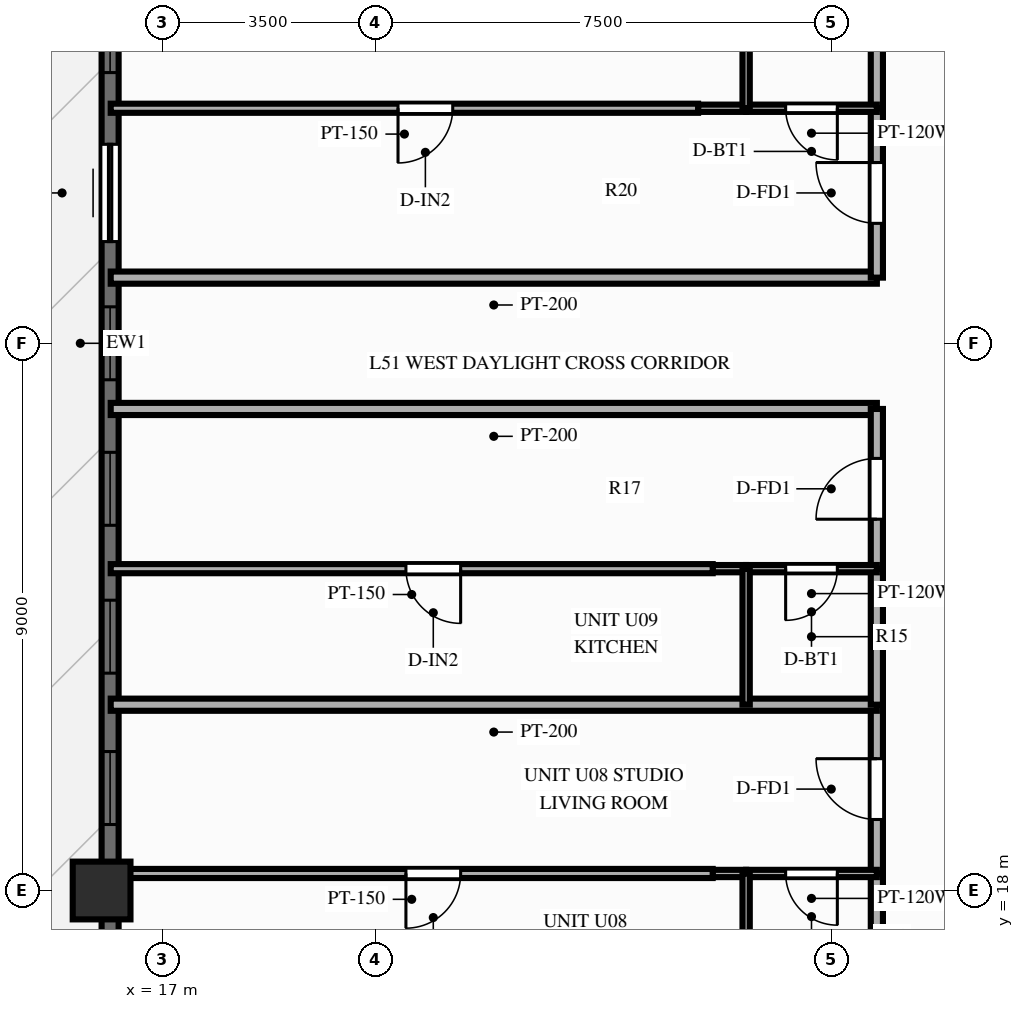
"""IFC4 building model, lengths in metres.
Left out: names, types, materials, properties, quantities, classifications, styles, units other than length and angle.
Written with IfcOpenShell. Run it as: python <this file> out.ifc"""

import sys

from ifc_helpers import new_model, si_unit, direction, frame, frame_2d, origin, origin_2d, place, context, subcontext, project, spatial, rectangle, extrude, source, transform, mapped, element, fill, save


model = new_model("IFC4")
c1 = context("Model", 3, precision=1e-05, world=origin(), true_north=direction((0.0, 1.0)))
c2 = subcontext(c1, "Body", "Model", "MODEL_VIEW")
j1 = project(units=[si_unit("LENGTHUNIT", "METRE"), si_unit("PLANEANGLEUNIT", "RADIAN")], contexts=[c1])
p1 = place(None, origin())
s1 = spatial("IfcSite", under=j1, at=p1, CompositionType="ELEMENT")
p2 = place(p1, origin())
s2 = spatial("IfcBuilding", under=s1, at=p2, CompositionType="ELEMENT")
p3 = place(p2, frame((0.0, 0.0, 163.0)))
s3 = spatial("IfcBuildingStorey", under=s2, at=p3, CompositionType="ELEMENT", Elevation=163.0)
m1 = source(origin(), c2, "Body", "SweptSolid", [
    extrude(rectangle(XDim=0.95, YDim=0.95, at=origin_2d()), origin(), (0.0, 0.0, 1.0), 3.0),
])
p4 = place(p3, frame((16.0, 18.0, 0.0), z_axis=(0.0, 0.0, 1.0), x_axis=(1.0, 0.0, 0.0)))
e1 = element("IfcColumn", 1, at=p4, inside=s3, PredefinedType="COLUMN", context=c2, shape_type="MappedRepresentation", body=[
    mapped(m1, transform((0.0, 0.0, 0.0), scale=1.0)),
])
p5 = place(p3, frame((16.14, 11.0, 0.0), z_axis=(0.0, 0.0, 1.0), x_axis=(0.0, 1.0, 0.0)))
e2 = element("IfcWall", 2, at=p5, inside=s3, PredefinedType="SOLIDWALL", context=c2, shape_type="SweptSolid", body=[
    extrude(rectangle(XDim=32.0, YDim=0.28, at=frame_2d((16.0, 0.0))), origin(), (0.0, 0.0, 1.0), 2.28),
])
p6 = place(p5, frame((1.001, 0.0, 0.25)))
e3 = element("IfcOpeningElement", 3, at=p6, cuts=e2, PredefinedType="OPENING", context=c2, shape_type="SweptSolid", body=[
    extrude(rectangle(XDim=1.2, YDim=1.5, at=frame_2d((0.6, 0.75))), frame((0.0, 0.152, 0.0), z_axis=(0.0, -1.0, 0.0), x_axis=(1.0, 0.0, 0.0)), (0.0, 0.0, 1.0), 0.304),
])
p7 = place(p5, frame((3.439, 0.0, 0.25)))
e4 = element("IfcOpeningElement", 4, at=p7, cuts=e2, PredefinedType="OPENING", context=c2, shape_type="SweptSolid", body=[
    extrude(rectangle(XDim=1.2, YDim=1.5, at=frame_2d((0.6, 0.75))), frame((0.0, 0.152, 0.0), z_axis=(0.0, -1.0, 0.0), x_axis=(1.0, 0.0, 0.0)), (0.0, 0.0, 1.0), 0.304),
])
p8 = place(p5, frame((5.588, 0.0, 0.25)))
e5 = element("IfcOpeningElement", 5, at=p8, cuts=e2, PredefinedType="OPENING", context=c2, shape_type="SweptSolid", body=[
    extrude(rectangle(XDim=0.7, YDim=1.5, at=frame_2d((0.35, 0.75))), frame((0.0, 0.152, 0.0), z_axis=(0.0, -1.0, 0.0), x_axis=(1.0, 0.0, 0.0)), (0.0, 0.0, 1.0), 0.304),
])
p9 = place(p5, frame((8.085, 0.0, 0.25)))
e6 = element("IfcOpeningElement", 6, at=p9, cuts=e2, PredefinedType="OPENING", context=c2, shape_type="SweptSolid", body=[
    extrude(rectangle(XDim=1.2, YDim=1.5, at=frame_2d((0.6, 0.75))), frame((0.0, 0.152, 0.0), z_axis=(0.0, -1.0, 0.0), x_axis=(1.0, 0.0, 0.0)), (0.0, 0.0, 1.0), 0.304),
])
p10 = place(p5, frame((10.575, 0.0, 0.25)))
e7 = element("IfcOpeningElement", 7, at=p10, cuts=e2, PredefinedType="OPENING", context=c2, shape_type="SweptSolid", body=[
    extrude(rectangle(XDim=1.2, YDim=1.5, at=frame_2d((0.6, 0.75))), frame((0.0, 0.152, 0.0), z_axis=(0.0, -1.0, 0.0), x_axis=(1.0, 0.0, 0.0)), (0.0, 0.0, 1.0), 0.304),
])
p11 = place(p5, frame((13.007, 0.0, 0.25)))
e8 = element("IfcOpeningElement", 8, at=p11, cuts=e2, PredefinedType="OPENING", context=c2, shape_type="SweptSolid", body=[
    extrude(rectangle(XDim=1.2, YDim=1.5, at=frame_2d((0.6, 0.75))), frame((0.0, 0.152, 0.0), z_axis=(0.0, -1.0, 0.0), x_axis=(1.0, 0.0, 0.0)), (0.0, 0.0, 1.0), 0.304),
])
p12 = place(p5, frame((15.4, 0.0, 0.25)))
e9 = element("IfcOpeningElement", 9, at=p12, cuts=e2, PredefinedType="OPENING", context=c2, shape_type="SweptSolid", body=[
    extrude(rectangle(XDim=1.2, YDim=1.5, at=frame_2d((0.6, 0.75))), frame((0.0, 0.152, 0.0), z_axis=(0.0, -1.0, 0.0), x_axis=(1.0, 0.0, 0.0)), (0.0, 0.0, 1.0), 0.304),
])
p13 = place(p5, frame((17.673, 0.0, 0.0)))
e10 = element("IfcOpeningElement", 10, at=p13, cuts=e2, PredefinedType="OPENING", context=c2, shape_type="SweptSolid", body=[
    extrude(rectangle(XDim=1.6, YDim=2.15, at=frame_2d((0.8, 1.075))), frame((0.0, 0.152, 0.0), z_axis=(0.0, -1.0, 0.0), x_axis=(1.0, 0.0, 0.0)), (0.0, 0.0, 1.0), 0.304),
])
p14 = place(p5, frame((20.452, 0.0, 0.25)))
e11 = element("IfcOpeningElement", 11, at=p14, cuts=e2, PredefinedType="OPENING", context=c2, shape_type="SweptSolid", body=[
    extrude(rectangle(XDim=1.2, YDim=1.5, at=frame_2d((0.6, 0.75))), frame((0.0, 0.152, 0.0), z_axis=(0.0, -1.0, 0.0), x_axis=(1.0, 0.0, 0.0)), (0.0, 0.0, 1.0), 0.304),
])
p15 = place(p5, frame((22.862, 0.0, 0.25)))
e12 = element("IfcOpeningElement", 12, at=p15, cuts=e2, PredefinedType="OPENING", context=c2, shape_type="SweptSolid", body=[
    extrude(rectangle(XDim=1.2, YDim=1.5, at=frame_2d((0.6, 0.75))), frame((0.0, 0.152, 0.0), z_axis=(0.0, -1.0, 0.0), x_axis=(1.0, 0.0, 0.0)), (0.0, 0.0, 1.0), 0.304),
])
p16 = place(p5, frame((25.734, 0.0, 0.25)))
e13 = element("IfcOpeningElement", 13, at=p16, cuts=e2, PredefinedType="OPENING", context=c2, shape_type="SweptSolid", body=[
    extrude(rectangle(XDim=0.95, YDim=1.5, at=frame_2d((0.475, 0.75))), frame((0.0, 0.152, 0.0), z_axis=(0.0, -1.0, 0.0), x_axis=(1.0, 0.0, 0.0)), (0.0, 0.0, 1.0), 0.304),
])
p17 = place(p5, frame((27.588, 0.0, 0.25)))
e14 = element("IfcOpeningElement", 14, at=p17, cuts=e2, PredefinedType="OPENING", context=c2, shape_type="SweptSolid", body=[
    extrude(rectangle(XDim=1.2, YDim=1.5, at=frame_2d((0.6, 0.75))), frame((0.0, 0.152, 0.0), z_axis=(0.0, -1.0, 0.0), x_axis=(1.0, 0.0, 0.0)), (0.0, 0.0, 1.0), 0.304),
])
p18 = place(p5, frame((29.879, 0.0, 0.25)))
e15 = element("IfcOpeningElement", 15, at=p18, cuts=e2, PredefinedType="OPENING", context=c2, shape_type="SweptSolid", body=[
    extrude(rectangle(XDim=1.2, YDim=1.5, at=frame_2d((0.6, 0.75))), frame((0.0, 0.152, 0.0), z_axis=(0.0, -1.0, 0.0), x_axis=(1.0, 0.0, 0.0)), (0.0, 0.0, 1.0), 0.304),
])
p19 = place(p3, frame((28.75, 25.92, 0.0), z_axis=(0.0, 0.0, 1.0), x_axis=(-1.0, 0.0, 0.0)))
e16 = element("IfcWall", 16, at=p19, inside=s3, PredefinedType="PARTITIONING", context=c2, shape_type="SweptSolid", body=[
    extrude(rectangle(XDim=12.6, YDim=0.2, at=frame_2d((6.3, 0.0))), origin(), (0.0, 0.0, 1.0), 2.79),
])
p20 = place(p3, frame((28.75, 16.192, 0.0), z_axis=(0.0, 0.0, 1.0), x_axis=(0.0, 1.0, 0.0)))
e17 = element("IfcWall", 17, at=p20, inside=s3, PredefinedType="PARTITIONING", context=c2, shape_type="SweptSolid", body=[
    extrude(rectangle(XDim=2.088, YDim=0.2, at=frame_2d((1.044, 0.0))), origin(), (0.0, 0.0, 1.0), 2.79),
])
p21 = place(p3, frame((28.75, 18.28, 0.0), z_axis=(0.0, 0.0, 1.0), x_axis=(0.0, 1.0, 0.0)))
e18 = element("IfcWall", 18, at=p21, inside=s3, PredefinedType="PARTITIONING", context=c2, shape_type="SweptSolid", body=[
    extrude(rectangle(XDim=2.776, YDim=0.2, at=frame_2d((1.388, 0.0))), origin(), (0.0, 0.0, 1.0), 2.79),
])
p22 = place(p21, frame((0.888, 0.0, 0.0)))
e19 = element("IfcOpeningElement", 19, at=p22, cuts=e18, PredefinedType="OPENING", context=c2, shape_type="SweptSolid", body=[
    extrude(rectangle(XDim=1.0, YDim=2.15, at=frame_2d((0.5, 1.075))), frame((0.0, 0.112, 0.0), z_axis=(0.0, -1.0, 0.0), x_axis=(1.0, 0.0, 0.0)), (0.0, 0.0, 1.0), 0.224),
])
p23 = place(p3, frame((28.75, 18.28, 0.0), z_axis=(0.0, 0.0, 1.0), x_axis=(-1.0, 0.0, 0.0)))
e20 = element("IfcWall", 20, at=p23, inside=s3, PredefinedType="PARTITIONING", context=c2, shape_type="SweptSolid", body=[
    extrude(rectangle(XDim=2.15, YDim=0.12, at=frame_2d((1.075, 0.0))), origin(), (0.0, 0.0, 1.0), 2.79),
])
p24 = place(p23, frame((0.65, 0.0, 0.0)))
e21 = element("IfcOpeningElement", 21, at=p24, cuts=e20, PredefinedType="OPENING", context=c2, shape_type="SweptSolid", body=[
    extrude(rectangle(XDim=0.85, YDim=2.05, at=frame_2d((0.425, 1.025))), frame((0.0, 0.072, 0.0), z_axis=(0.0, -1.0, 0.0), x_axis=(1.0, 0.0, 0.0)), (0.0, 0.0, 1.0), 0.144),
])
p25 = place(p3, frame((26.6, 18.28, 0.0), z_axis=(0.0, 0.0, 1.0), x_axis=(-1.0, 0.0, 0.0)))
e22 = element("IfcWall", 22, at=p25, inside=s3, PredefinedType="PARTITIONING", context=c2, shape_type="SweptSolid", body=[
    extrude(rectangle(XDim=0.55, YDim=0.12, at=frame_2d((0.275, 0.0))), origin(), (0.0, 0.0, 1.0), 2.79),
])
p26 = place(p3, frame((26.6, 16.192, 0.0), z_axis=(0.0, 0.0, 1.0), x_axis=(0.0, 1.0, 0.0)))
e23 = element("IfcWall", 23, at=p26, inside=s3, PredefinedType="PARTITIONING", context=c2, shape_type="SweptSolid", body=[
    extrude(rectangle(XDim=2.088, YDim=0.12, at=frame_2d((1.044, 0.0))), origin(), (0.0, 0.0, 1.0), 2.79),
])
p27 = place(p3, frame((26.05, 18.28, 0.0), z_axis=(0.0, 0.0, 1.0), x_axis=(-1.0, 0.0, 0.0)))
e24 = element("IfcWall", 24, at=p27, inside=s3, PredefinedType="PARTITIONING", context=c2, shape_type="SweptSolid", body=[
    extrude(rectangle(XDim=9.9, YDim=0.15, at=frame_2d((4.95, 0.0))), origin(), (0.0, 0.0, 1.0), 2.79),
])
p28 = place(p27, frame((4.145, 0.0, 0.0)))
e25 = element("IfcOpeningElement", 25, at=p28, cuts=e24, PredefinedType="OPENING", context=c2, shape_type="SweptSolid", body=[
    extrude(rectangle(XDim=0.9, YDim=2.1, at=frame_2d((0.45, 1.05))), frame((0.0, 0.087, 0.0), z_axis=(0.0, -1.0, 0.0), x_axis=(1.0, 0.0, 0.0)), (0.0, 0.0, 1.0), 0.174),
])
p29 = place(p3, frame((28.75, 21.056, 0.0), z_axis=(0.0, 0.0, 1.0), x_axis=(-1.0, 0.0, 0.0)))
e26 = element("IfcWall", 26, at=p29, inside=s3, PredefinedType="PARTITIONING", context=c2, shape_type="SweptSolid", body=[
    extrude(rectangle(XDim=12.6, YDim=0.2, at=frame_2d((6.3, 0.0))), origin(), (0.0, 0.0, 1.0), 2.79),
])
p30 = place(p3, frame((28.75, 21.056, 0.0), z_axis=(0.0, 0.0, 1.0), x_axis=(0.0, 1.0, 0.0)))
e27 = element("IfcWall", 27, at=p30, inside=s3, PredefinedType="PARTITIONING", context=c2, shape_type="SweptSolid", body=[
    extrude(rectangle(XDim=2.237, YDim=0.2, at=frame_2d((1.119, 0.0))), origin(), (0.0, 0.0, 1.0), 2.79),
])
p31 = place(p3, frame((28.75, 23.293, 0.0), z_axis=(0.0, 0.0, 1.0), x_axis=(0.0, 1.0, 0.0)))
e28 = element("IfcWall", 28, at=p31, inside=s3, PredefinedType="PARTITIONING", context=c2, shape_type="SweptSolid", body=[
    extrude(rectangle(XDim=2.627, YDim=0.2, at=frame_2d((1.313, 0.0))), origin(), (0.0, 0.0, 1.0), 2.79),
])
p32 = place(p31, frame((0.813, 0.0, 0.0)))
e29 = element("IfcOpeningElement", 29, at=p32, cuts=e28, PredefinedType="OPENING", context=c2, shape_type="SweptSolid", body=[
    extrude(rectangle(XDim=1.0, YDim=2.15, at=frame_2d((0.5, 1.075))), frame((0.0, 0.112, 0.0), z_axis=(0.0, -1.0, 0.0), x_axis=(1.0, 0.0, 0.0)), (0.0, 0.0, 1.0), 0.224),
])
p33 = place(p3, frame((28.75, 23.293, 0.0), z_axis=(0.0, 0.0, 1.0), x_axis=(-1.0, 0.0, 0.0)))
e30 = element("IfcWall", 30, at=p33, inside=s3, PredefinedType="PARTITIONING", context=c2, shape_type="SweptSolid", body=[
    extrude(rectangle(XDim=2.15, YDim=0.12, at=frame_2d((1.075, 0.0))), origin(), (0.0, 0.0, 1.0), 2.79),
])
p34 = place(p33, frame((0.65, 0.0, 0.0)))
e31 = element("IfcOpeningElement", 31, at=p34, cuts=e30, PredefinedType="OPENING", context=c2, shape_type="SweptSolid", body=[
    extrude(rectangle(XDim=0.85, YDim=2.05, at=frame_2d((0.425, 1.025))), frame((0.0, 0.072, 0.0), z_axis=(0.0, -1.0, 0.0), x_axis=(1.0, 0.0, 0.0)), (0.0, 0.0, 1.0), 0.144),
])
p35 = place(p3, frame((26.6, 23.293, 0.0), z_axis=(0.0, 0.0, 1.0), x_axis=(-1.0, 0.0, 0.0)))
e32 = element("IfcWall", 32, at=p35, inside=s3, PredefinedType="PARTITIONING", context=c2, shape_type="SweptSolid", body=[
    extrude(rectangle(XDim=0.55, YDim=0.12, at=frame_2d((0.275, 0.0))), origin(), (0.0, 0.0, 1.0), 2.79),
])
p36 = place(p3, frame((26.6, 21.056, 0.0), z_axis=(0.0, 0.0, 1.0), x_axis=(0.0, 1.0, 0.0)))
e33 = element("IfcWall", 33, at=p36, inside=s3, PredefinedType="PARTITIONING", context=c2, shape_type="SweptSolid", body=[
    extrude(rectangle(XDim=2.237, YDim=0.12, at=frame_2d((1.119, 0.0))), origin(), (0.0, 0.0, 1.0), 2.79),
])
p37 = place(p3, frame((26.05, 23.293, 0.0), z_axis=(0.0, 0.0, 1.0), x_axis=(-1.0, 0.0, 0.0)))
e34 = element("IfcWall", 34, at=p37, inside=s3, PredefinedType="PARTITIONING", context=c2, shape_type="SweptSolid", body=[
    extrude(rectangle(XDim=9.9, YDim=0.15, at=frame_2d((4.95, 0.0))), origin(), (0.0, 0.0, 1.0), 2.79),
])
p38 = place(p37, frame((4.145, 0.0, 0.0)))
e35 = element("IfcOpeningElement", 35, at=p38, cuts=e34, PredefinedType="OPENING", context=c2, shape_type="SweptSolid", body=[
    extrude(rectangle(XDim=0.9, YDim=2.1, at=frame_2d((0.45, 1.05))), frame((0.0, 0.087, 0.0), z_axis=(0.0, -1.0, 0.0), x_axis=(1.0, 0.0, 0.0)), (0.0, 0.0, 1.0), 0.174),
])
p39 = place(p3, frame((28.75, 28.08, 0.0), z_axis=(0.0, 0.0, 1.0), x_axis=(-1.0, 0.0, 0.0)))
e36 = element("IfcWall", 36, at=p39, inside=s3, PredefinedType="PARTITIONING", context=c2, shape_type="SweptSolid", body=[
    extrude(rectangle(XDim=12.6, YDim=0.2, at=frame_2d((6.3, 0.0))), origin(), (0.0, 0.0, 1.0), 2.79),
])
p40 = place(p3, frame((28.75, 28.08, 0.0), z_axis=(0.0, 0.0, 1.0), x_axis=(0.0, 1.0, 0.0)))
e37 = element("IfcWall", 37, at=p40, inside=s3, PredefinedType="PARTITIONING", context=c2, shape_type="SweptSolid", body=[
    extrude(rectangle(XDim=2.786, YDim=0.2, at=frame_2d((1.393, 0.0))), origin(), (0.0, 0.0, 1.0), 2.79),
])
p41 = place(p40, frame((0.893, 0.0, 0.0)))
e38 = element("IfcOpeningElement", 38, at=p41, cuts=e37, PredefinedType="OPENING", context=c2, shape_type="SweptSolid", body=[
    extrude(rectangle(XDim=1.0, YDim=2.15, at=frame_2d((0.5, 1.075))), frame((0.0, 0.112, 0.0), z_axis=(0.0, -1.0, 0.0), x_axis=(1.0, 0.0, 0.0)), (0.0, 0.0, 1.0), 0.224),
])
p42 = place(p3, frame((28.75, 30.866, 0.0), z_axis=(0.0, 0.0, 1.0), x_axis=(0.0, 1.0, 0.0)))
e39 = element("IfcWall", 39, at=p42, inside=s3, PredefinedType="PARTITIONING", context=c2, shape_type="SweptSolid", body=[
    extrude(rectangle(XDim=2.373, YDim=0.2, at=frame_2d((1.187, 0.0))), origin(), (0.0, 0.0, 1.0), 2.79),
])
p43 = place(p3, frame((28.75, 30.866, 0.0), z_axis=(0.0, 0.0, 1.0), x_axis=(-1.0, 0.0, 0.0)))
e40 = element("IfcWall", 40, at=p43, inside=s3, PredefinedType="PARTITIONING", context=c2, shape_type="SweptSolid", body=[
    extrude(rectangle(XDim=2.15, YDim=0.12, at=frame_2d((1.075, 0.0))), origin(), (0.0, 0.0, 1.0), 2.79),
])
p44 = place(p43, frame((0.65, 0.0, 0.0)))
e41 = element("IfcOpeningElement", 41, at=p44, cuts=e40, PredefinedType="OPENING", context=c2, shape_type="SweptSolid", body=[
    extrude(rectangle(XDim=0.85, YDim=2.05, at=frame_2d((0.425, 1.025))), frame((0.0, 0.072, 0.0), z_axis=(0.0, -1.0, 0.0), x_axis=(1.0, 0.0, 0.0)), (0.0, 0.0, 1.0), 0.144),
])
p45 = place(p3, frame((26.6, 30.866, 0.0), z_axis=(0.0, 0.0, 1.0), x_axis=(-1.0, 0.0, 0.0)))
e42 = element("IfcWall", 42, at=p45, inside=s3, PredefinedType="PARTITIONING", context=c2, shape_type="SweptSolid", body=[
    extrude(rectangle(XDim=0.79, YDim=0.12, at=frame_2d((0.395, 0.0))), origin(), (0.0, 0.0, 1.0), 2.79),
])
p46 = place(p3, frame((26.6, 30.866, 0.0), z_axis=(0.0, 0.0, 1.0), x_axis=(0.0, 1.0, 0.0)))
e43 = element("IfcWall", 43, at=p46, inside=s3, PredefinedType="PARTITIONING", context=c2, shape_type="SweptSolid", body=[
    extrude(rectangle(XDim=2.373, YDim=0.12, at=frame_2d((1.187, 0.0))), origin(), (0.0, 0.0, 1.0), 2.79),
])
p47 = place(p3, frame((25.81, 30.866, 0.0), z_axis=(0.0, 0.0, 1.0), x_axis=(-1.0, 0.0, 0.0)))
e44 = element("IfcWall", 44, at=p47, inside=s3, PredefinedType="PARTITIONING", context=c2, shape_type="SweptSolid", body=[
    extrude(rectangle(XDim=9.66, YDim=0.15, at=frame_2d((4.83, 0.0))), origin(), (0.0, 0.0, 1.0), 2.79),
])
p48 = place(p47, frame((4.035, 0.0, 0.0)))
e45 = element("IfcOpeningElement", 45, at=p48, cuts=e44, PredefinedType="OPENING", context=c2, shape_type="SweptSolid", body=[
    extrude(rectangle(XDim=0.9, YDim=2.1, at=frame_2d((0.45, 1.05))), frame((0.0, 0.087, 0.0), z_axis=(0.0, -1.0, 0.0), x_axis=(1.0, 0.0, 0.0)), (0.0, 0.0, 1.0), 0.174),
])
m2 = source(origin(), c2, "Body", "SweptSolid", [
    extrude(rectangle(XDim=1.2, YDim=1.5, at=frame_2d((0.6, 0.75))), frame((0.0, 0.03, 0.0), z_axis=(0.0, -1.0, 0.0), x_axis=(1.0, 0.0, 0.0)), (0.0, 0.0, 1.0), 0.06),
])
p49 = place(p9, origin())
e46 = element("IfcWindow", 46, at=p49, inside=s3, PartitioningType="SINGLE_PANEL", PredefinedType="WINDOW", context=c2, shape_type="MappedRepresentation", body=[
    mapped(m2, transform((0.0, 0.0, 0.0), scale=1.0)),
])
fill(e6, e46)
p50 = place(p10, origin())
e47 = element("IfcWindow", 47, at=p50, inside=s3, PartitioningType="SINGLE_PANEL", PredefinedType="WINDOW", context=c2, shape_type="MappedRepresentation", body=[
    mapped(m2, transform((0.0, 0.0, 0.0), scale=1.0)),
])
fill(e7, e47)
p51 = place(p11, origin())
e48 = element("IfcWindow", 48, at=p51, inside=s3, PartitioningType="SINGLE_PANEL", PredefinedType="WINDOW", context=c2, shape_type="MappedRepresentation", body=[
    mapped(m2, transform((0.0, 0.0, 0.0), scale=1.0)),
])
fill(e8, e48)
p52 = place(p12, origin())
e49 = element("IfcWindow", 49, at=p52, inside=s3, PartitioningType="SINGLE_PANEL", PredefinedType="WINDOW", context=c2, shape_type="MappedRepresentation", body=[
    mapped(m2, transform((0.0, 0.0, 0.0), scale=1.0)),
])
fill(e9, e49)
m3 = source(origin(), c2, "Body", "SweptSolid", [
    extrude(rectangle(XDim=1.6, YDim=2.15, at=frame_2d((0.8, 1.075))), frame((0.0, 0.025, 0.0), z_axis=(0.0, -1.0, 0.0), x_axis=(1.0, 0.0, 0.0)), (0.0, 0.0, 1.0), 0.05),
])
p53 = place(p13, origin())
e50 = element("IfcDoor", 50, at=p53, inside=s3, OperationType="SLIDING_TO_LEFT", PredefinedType="DOOR", context=c2, shape_type="MappedRepresentation", body=[
    mapped(m3, transform((0.0, 0.0, 0.0), scale=1.0)),
])
fill(e10, e50)
p54 = place(p14, origin())
e51 = element("IfcWindow", 51, at=p54, inside=s3, PartitioningType="SINGLE_PANEL", PredefinedType="WINDOW", context=c2, shape_type="MappedRepresentation", body=[
    mapped(m2, transform((0.0, 0.0, 0.0), scale=1.0)),
])
fill(e11, e51)
m4 = source(origin(), c2, "Body", "SweptSolid", [
    extrude(rectangle(XDim=1.0, YDim=2.15, at=frame_2d((0.5, 1.075))), frame((0.0, 0.025, 0.0), z_axis=(0.0, -1.0, 0.0), x_axis=(1.0, 0.0, 0.0)), (0.0, 0.0, 1.0), 0.05),
])
p55 = place(p22, origin())
e52 = element("IfcDoor", 52, at=p55, inside=s3, OperationType="SINGLE_SWING_RIGHT", PredefinedType="DOOR", context=c2, shape_type="MappedRepresentation", body=[
    mapped(m4, transform((0.0, 0.0, 0.0), scale=1.0)),
])
fill(e19, e52)
m5 = source(origin(), c2, "Body", "SweptSolid", [
    extrude(rectangle(XDim=0.85, YDim=2.05, at=frame_2d((0.425, 1.025))), frame((0.0, 0.025, 0.0), z_axis=(0.0, -1.0, 0.0), x_axis=(1.0, 0.0, 0.0)), (0.0, 0.0, 1.0), 0.05),
])
p56 = place(p24, origin())
e53 = element("IfcDoor", 53, at=p56, inside=s3, OperationType="SINGLE_SWING_LEFT", PredefinedType="DOOR", context=c2, shape_type="MappedRepresentation", body=[
    mapped(m5, transform((0.0, 0.0, 0.0), scale=1.0)),
])
fill(e21, e53)
m6 = source(origin(), c2, "Body", "SweptSolid", [
    extrude(rectangle(XDim=0.9, YDim=2.1, at=frame_2d((0.45, 1.05))), frame((0.0, 0.025, 0.0), z_axis=(0.0, -1.0, 0.0), x_axis=(1.0, 0.0, 0.0)), (0.0, 0.0, 1.0), 0.05),
])
p57 = place(p28, origin())
e54 = element("IfcDoor", 54, at=p57, inside=s3, OperationType="SINGLE_SWING_RIGHT", PredefinedType="DOOR", context=c2, shape_type="MappedRepresentation", body=[
    mapped(m6, transform((0.0, 0.0, 0.0), scale=1.0)),
])
fill(e25, e54)
p58 = place(p32, origin())
e55 = element("IfcDoor", 55, at=p58, inside=s3, OperationType="SINGLE_SWING_LEFT", PredefinedType="DOOR", context=c2, shape_type="MappedRepresentation", body=[
    mapped(m4, transform((0.0, 0.0, 0.0), scale=1.0)),
])
fill(e29, e55)
p59 = place(p34, origin())
e56 = element("IfcDoor", 56, at=p59, inside=s3, OperationType="SINGLE_SWING_RIGHT", PredefinedType="DOOR", context=c2, shape_type="MappedRepresentation", body=[
    mapped(m5, transform((0.0, 0.0, 0.0), scale=1.0)),
])
fill(e31, e56)
p60 = place(p38, origin())
e57 = element("IfcDoor", 57, at=p60, inside=s3, OperationType="SINGLE_SWING_LEFT", PredefinedType="DOOR", context=c2, shape_type="MappedRepresentation", body=[
    mapped(m6, transform((0.0, 0.0, 0.0), scale=1.0)),
])
fill(e35, e57)
p61 = place(p41, origin())
e58 = element("IfcDoor", 58, at=p61, inside=s3, OperationType="SINGLE_SWING_RIGHT", PredefinedType="DOOR", context=c2, shape_type="MappedRepresentation", body=[
    mapped(m4, transform((0.0, 0.0, 0.0), scale=1.0)),
])
fill(e38, e58)
p62 = place(p44, origin())
e59 = element("IfcDoor", 59, at=p62, inside=s3, OperationType="SINGLE_SWING_LEFT", PredefinedType="DOOR", context=c2, shape_type="MappedRepresentation", body=[
    mapped(m5, transform((0.0, 0.0, 0.0), scale=1.0)),
])
fill(e41, e59)
p63 = place(p48, origin())
e60 = element("IfcDoor", 60, at=p63, inside=s3, OperationType="SINGLE_SWING_RIGHT", PredefinedType="DOOR", context=c2, shape_type="MappedRepresentation", body=[
    mapped(m6, transform((0.0, 0.0, 0.0), scale=1.0)),
])
fill(e45, e60)
save(model, sys.argv[1])
